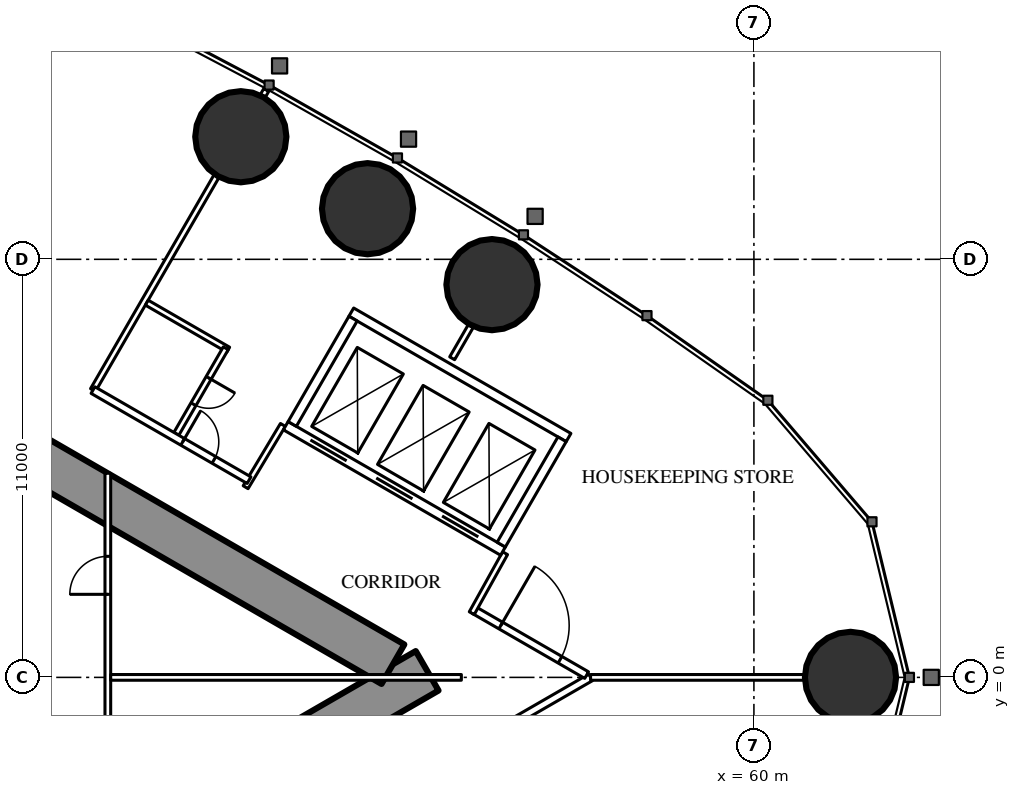
"""IFC4 building model, lengths in metres.
Left out: names, types, materials, properties, quantities, classifications, styles, units other than length and angle.
Written with IfcOpenShell. Run it as: python <this file> out.ifc"""

import sys

from ifc_helpers import new_model, si_unit, direction, frame, frame_2d, origin, origin_2d, place, context, subcontext, project, spatial, rectangle, circle, extrude, element, fill, save


model = new_model("IFC4")
c1 = context("Model", 3, precision=1e-05, world=origin(), true_north=direction((0.0, 1.0)))
c2 = subcontext(c1, "Body", "Model", "MODEL_VIEW")
j1 = project(units=[si_unit("LENGTHUNIT", "METRE"), si_unit("PLANEANGLEUNIT", "RADIAN")], contexts=[c1])
p1 = place(None, origin())
s1 = spatial("IfcSite", under=j1, at=p1, CompositionType="ELEMENT")
p2 = place(p1, origin())
s2 = spatial("IfcBuilding", under=s1, at=p2, CompositionType="ELEMENT")
p3 = place(p2, frame((0.0, 0.0, 240.5)))
s3 = spatial("IfcBuildingStorey", under=s2, at=p3, CompositionType="ELEMENT", Elevation=240.5)
for number, where, z_axis, x_axis in (
    (1, (62.542, 0.0, 0.0), (0.0, 0.0, 1.0), (1.0, 0.0, 0.0)),
    (2, (53.108, 10.334, 0.0), (0.0, 0.0, 1.0), (1.0, 0.0, 0.0)),
    (3, (49.834, 12.332, 0.0), (0.0, 0.0, 1.0), (1.0, 0.0, 0.0)),
    (4, (46.499, 14.226, 0.0), (0.0, 0.0, 1.0), (1.0, 0.0, 0.0)),
):
    element("IfcColumn", number, at=place(p3, frame(where, z_axis=z_axis, x_axis=x_axis)), inside=s3, PredefinedType="COLUMN", context=c2, shape_type="SweptSolid", body=[
        extrude(circle(Radius=1.2, at=origin_2d()), origin(), (0.0, 0.0, 1.0), 3.6),
    ])
p4 = place(p3, frame((27.2, -13.8, 0.0), z_axis=(0.0, 0.0, 1.0), x_axis=(0.866027159892, 0.499996958321, 0.0)))
e5 = element("IfcWall", 5, at=p4, inside=s3, PredefinedType="SHEAR", context=c2, shape_type="SweptSolid", body=[
    extrude(rectangle(XDim=27.947, YDim=1.2, at=frame_2d((13.973, 0.0))), origin(), (0.0, 0.0, 1.0), 3.6),
])
p5 = place(p4, frame((4.6, 0.0, 0.0)))
e6 = element("IfcOpeningElement", 6, at=p5, cuts=e5, PredefinedType="OPENING", context=c2, shape_type="SweptSolid", body=[
    extrude(rectangle(XDim=1.0, YDim=2.2, at=frame_2d((0.5, 1.1))), frame((0.0, 0.61, 0.0), z_axis=(0.0, -1.0, 0.0), x_axis=(1.0, 0.0, 0.0)), (0.0, 0.0, 1.0), 1.22),
])
p6 = place(p4, frame((13.395, 0.0, 0.0)))
e7 = element("IfcOpeningElement", 7, at=p6, cuts=e5, PredefinedType="OPENING", context=c2, shape_type="SweptSolid", body=[
    extrude(rectangle(XDim=1.8, YDim=2.2, at=frame_2d((0.9, 1.1))), frame((0.0, 0.61, 0.0), z_axis=(0.0, -1.0, 0.0), x_axis=(1.0, 0.0, 0.0)), (0.0, 0.0, 1.0), 1.22),
])
p7 = place(p3, frame((27.2, 13.8, 0.0), z_axis=(0.0, 0.0, 1.0), x_axis=(0.866024515034, -0.500001539357, 0.0)))
e8 = element("IfcWall", 8, at=p7, inside=s3, PredefinedType="SHEAR", context=c2, shape_type="SweptSolid", body=[
    extrude(rectangle(XDim=26.907, YDim=1.2, at=frame_2d((13.454, 0.0))), origin(), (0.0, 0.0, 1.0), 3.6),
])
p8 = place(p7, frame((4.6, 0.0, 0.0)))
e9 = element("IfcOpeningElement", 9, at=p8, cuts=e8, PredefinedType="OPENING", context=c2, shape_type="SweptSolid", body=[
    extrude(rectangle(XDim=1.0, YDim=2.2, at=frame_2d((0.5, 1.1))), frame((0.0, 0.61, 0.0), z_axis=(0.0, -1.0, 0.0), x_axis=(1.0, 0.0, 0.0)), (0.0, 0.0, 1.0), 1.22),
])
p9 = place(p7, frame((13.395, 0.0, 0.0)))
e10 = element("IfcOpeningElement", 10, at=p9, cuts=e8, PredefinedType="OPENING", context=c2, shape_type="SweptSolid", body=[
    extrude(rectangle(XDim=1.8, YDim=2.2, at=frame_2d((0.9, 1.1))), frame((0.0, 0.61, 0.0), z_axis=(0.0, -1.0, 0.0), x_axis=(1.0, 0.0, 0.0)), (0.0, 0.0, 1.0), 1.22),
])
p10 = place(p3, frame((28.959, -15.44, 0.0), z_axis=(0.0, 0.0, 1.0), x_axis=(0.866025227435, 0.500000305447, 0.0)))
e11 = element("IfcWall", 11, at=p10, inside=s3, PredefinedType="PARTITIONING", context=c2, shape_type="SweptSolid", body=[
    extrude(rectangle(XDim=30.88, YDim=0.2, at=frame_2d((15.44, 0.0))), origin(), (0.0, 0.0, 1.0), 3.35),
])
p11 = place(p10, frame((1.494, 0.0, 0.0)))
e12 = element("IfcOpeningElement", 12, at=p11, cuts=e11, PredefinedType="OPENING", context=c2, shape_type="SweptSolid", body=[
    extrude(rectangle(XDim=1.8, YDim=2.03, at=frame_2d((0.9, 1.015))), frame((0.0, 0.11, 0.0), z_axis=(0.0, -1.0, 0.0), x_axis=(1.0, 0.0, 0.0)), (0.0, 0.0, 1.0), 0.22),
])
p12 = place(p10, frame((7.687, 0.0, 0.0)))
e13 = element("IfcOpeningElement", 13, at=p12, cuts=e11, PredefinedType="OPENING", context=c2, shape_type="SweptSolid", body=[
    extrude(rectangle(XDim=1.0, YDim=2.2, at=frame_2d((0.5, 1.1))), frame((0.0, 0.11, 0.0), z_axis=(0.0, -1.0, 0.0), x_axis=(1.0, 0.0, 0.0)), (0.0, 0.0, 1.0), 0.22),
])
p13 = place(p10, frame((16.137, 0.0, 0.0)))
e14 = element("IfcOpeningElement", 14, at=p13, cuts=e11, PredefinedType="OPENING", context=c2, shape_type="SweptSolid", body=[
    extrude(rectangle(XDim=0.95, YDim=2.2, at=frame_2d((0.475, 1.1))), frame((0.0, 0.11, 0.0), z_axis=(0.0, -1.0, 0.0), x_axis=(1.0, 0.0, 0.0)), (0.0, 0.0, 1.0), 0.22),
])
p14 = place(p10, frame((20.021, 0.0, 0.0)))
e15 = element("IfcOpeningElement", 15, at=p14, cuts=e11, PredefinedType="OPENING", context=c2, shape_type="SweptSolid", body=[
    extrude(rectangle(XDim=0.95, YDim=2.2, at=frame_2d((0.475, 1.1))), frame((0.0, 0.11, 0.0), z_axis=(0.0, -1.0, 0.0), x_axis=(1.0, 0.0, 0.0)), (0.0, 0.0, 1.0), 0.22),
])
p15 = place(p10, frame((26.253, 0.0, 0.0)))
e16 = element("IfcOpeningElement", 16, at=p15, cuts=e11, PredefinedType="OPENING", context=c2, shape_type="SweptSolid", body=[
    extrude(rectangle(XDim=0.95, YDim=2.2, at=frame_2d((0.475, 1.1))), frame((0.0, 0.11, 0.0), z_axis=(0.0, -1.0, 0.0), x_axis=(1.0, 0.0, 0.0)), (0.0, 0.0, 1.0), 0.22),
])
p16 = place(p3, frame((42.61, 7.559, 0.0), z_axis=(0.0, 0.0, 1.0), x_axis=(0.500014058812, 0.866017286774, 0.0)))
e17 = element("IfcWall", 17, at=p16, inside=s3, PredefinedType="PARTITIONING", context=c2, shape_type="SweptSolid", body=[
    extrude(rectangle(XDim=6.498, YDim=0.15, at=frame_2d((3.249, 0.0))), origin(), (0.0, 0.0, 1.0), 2.45),
])
p17 = place(p3, frame((47.079, 15.3, 0.0), z_axis=(0.0, 0.0, 1.0), x_axis=(0.499212083968, 0.866479829667, 0.0)))
e18 = element("IfcWall", 18, at=p17, inside=s3, PredefinedType="PARTITIONING", context=c2, shape_type="SweptSolid", body=[
    extrude(rectangle(XDim=0.179, YDim=0.15, at=frame_2d((0.09, 0.0))), origin(), (0.0, 0.0, 1.0), 2.45),
])
p18 = place(p3, frame((55.702, 0.0, 0.0), z_axis=(0.0, 0.0, 1.0), x_axis=(1.0, 0.0, 0.0)))
e19 = element("IfcWall", 19, at=p18, inside=s3, PredefinedType="PARTITIONING", context=c2, shape_type="SweptSolid", body=[
    extrude(rectangle(XDim=5.619, YDim=0.15, at=frame_2d((2.81, 0.0))), origin(), (0.0, 0.0, 1.0), 2.45),
])
p19 = place(p3, frame((52.06, 8.396, 0.0), z_axis=(0.0, 0.0, 1.0), x_axis=(0.500095379624, 0.865970329329, 0.0)))
e20 = element("IfcWall", 20, at=p19, inside=s3, PredefinedType="PARTITIONING", context=c2, shape_type="SweptSolid", body=[
    extrude(rectangle(XDim=0.982, YDim=0.15, at=frame_2d((0.491, 0.0))), origin(), (0.0, 0.0, 1.0), 3.35),
])
p20 = place(p3, frame((52.639, 1.769, 0.0), z_axis=(0.0, 0.0, 1.0), x_axis=(0.866027340901, -0.4999966448, 0.0)))
e21 = element("IfcWall", 21, at=p20, inside=s3, PredefinedType="PARTITIONING", context=c2, shape_type="SweptSolid", body=[
    extrude(rectangle(XDim=3.417, YDim=0.2, at=frame_2d((1.708, 0.0))), origin(), (0.0, 0.0, 1.0), 3.35),
])
p21 = place(p20, frame((0.809, 0.0, 0.0)))
e22 = element("IfcOpeningElement", 22, at=p21, cuts=e21, PredefinedType="OPENING", context=c2, shape_type="SweptSolid", body=[
    extrude(rectangle(XDim=1.8, YDim=2.2, at=frame_2d((0.9, 1.1))), frame((0.0, 0.11, 0.0), z_axis=(0.0, -1.0, 0.0), x_axis=(1.0, 0.0, 0.0)), (0.0, 0.0, 1.0), 0.22),
])
p22 = place(p3, frame((47.606, 6.642, 0.0), z_axis=(0.0, 0.0, 1.0), x_axis=(-0.51353662755, -0.858067673418, 0.0)))
e23 = element("IfcWall", 23, at=p22, inside=s3, PredefinedType="PARTITIONING", context=c2, shape_type="SweptSolid", body=[
    extrude(rectangle(XDim=1.91, YDim=0.15, at=frame_2d((0.955, 0.0))), origin(), (0.0, 0.0, 1.0), 3.35),
])
p23 = place(p3, frame((52.576, 1.689, 0.0), z_axis=(0.0, 0.0, 1.0), x_axis=(0.485424724123, 0.874278466629, 0.0)))
e24 = element("IfcWall", 24, at=p23, inside=s3, PredefinedType="PARTITIONING", context=c2, shape_type="SweptSolid", body=[
    extrude(rectangle(XDim=1.805, YDim=0.15, at=frame_2d((0.903, 0.0))), origin(), (0.0, 0.0, 1.0), 3.35),
])
p24 = place(p3, frame((44.025, 9.86, 0.0), z_axis=(0.0, 0.0, 1.0), x_axis=(0.866006523861, -0.500032699561, 0.0)))
e25 = element("IfcWall", 25, at=p24, inside=s3, PredefinedType="PARTITIONING", context=c2, shape_type="SweptSolid", body=[
    extrude(rectangle(XDim=2.475, YDim=0.15, at=frame_2d((1.237, 0.0))), origin(), (0.0, 0.0, 1.0), 3.35),
])
p25 = place(p3, frame((44.803, 6.408, 0.0), z_axis=(0.0, 0.0, 1.0), x_axis=(0.500047596559, 0.865997922154, 0.0)))
e26 = element("IfcWall", 26, at=p25, inside=s3, PredefinedType="PARTITIONING", context=c2, shape_type="SweptSolid", body=[
    extrude(rectangle(XDim=2.6, YDim=0.15, at=frame_2d((1.3, 0.0))), origin(), (0.0, 0.0, 1.0), 3.35),
])
p26 = place(p25, frame((0.9, 0.0, 0.0)))
e27 = element("IfcOpeningElement", 27, at=p26, cuts=e26, PredefinedType="OPENING", context=c2, shape_type="SweptSolid", body=[
    extrude(rectangle(XDim=0.8, YDim=2.2, at=frame_2d((0.4, 1.1))), frame((0.0, 0.085, 0.0), z_axis=(0.0, -1.0, 0.0), x_axis=(1.0, 0.0, 0.0)), (0.0, 0.0, 1.0), 0.17),
])
p27 = place(p3, frame((42.61, 7.559, 0.0), z_axis=(0.0, 0.0, 1.0), x_axis=(0.866032081755, -0.499988433238, 0.0)))
e28 = element("IfcWall", 28, at=p27, inside=s3, PredefinedType="PARTITIONING", context=c2, shape_type="SweptSolid", body=[
    extrude(rectangle(XDim=4.741, YDim=0.2, at=frame_2d((2.37, 0.0))), origin(), (0.0, 0.0, 1.0), 3.35),
])
p28 = place(p27, frame((2.725, 0.0, 0.0)))
e29 = element("IfcOpeningElement", 29, at=p28, cuts=e28, PredefinedType="OPENING", context=c2, shape_type="SweptSolid", body=[
    extrude(rectangle(XDim=0.95, YDim=2.2, at=frame_2d((0.475, 1.1))), frame((0.0, 0.11, 0.0), z_axis=(0.0, -1.0, 0.0), x_axis=(1.0, 0.0, 0.0)), (0.0, 0.0, 1.0), 0.22),
])
p29 = place(p3, frame((43.0, -5.371, 0.0), z_axis=(0.0, 0.0, 1.0), x_axis=(0.0, 1.0, 0.0)))
e30 = element("IfcWall", 30, at=p29, inside=s3, PredefinedType="PARTITIONING", context=c2, shape_type="SweptSolid", body=[
    extrude(rectangle(XDim=10.741, YDim=0.15, at=frame_2d((5.371, 0.0))), origin(), (0.0, 0.0, 1.0), 3.35),
])
p30 = place(p29, frame((2.185, 0.0, 0.0)))
e31 = element("IfcOpeningElement", 31, at=p30, cuts=e30, PredefinedType="OPENING", context=c2, shape_type="SweptSolid", body=[
    extrude(rectangle(XDim=1.0, YDim=2.2, at=frame_2d((0.5, 1.1))), frame((0.0, 0.085, 0.0), z_axis=(0.0, -1.0, 0.0), x_axis=(1.0, 0.0, 0.0)), (0.0, 0.0, 1.0), 0.17),
])
p31 = place(p29, frame((7.556, 0.0, 0.0)))
e32 = element("IfcOpeningElement", 32, at=p31, cuts=e30, PredefinedType="OPENING", context=c2, shape_type="SweptSolid", body=[
    extrude(rectangle(XDim=1.0, YDim=2.2, at=frame_2d((0.5, 1.1))), frame((0.0, 0.085, 0.0), z_axis=(0.0, -1.0, 0.0), x_axis=(1.0, 0.0, 0.0)), (0.0, 0.0, 1.0), 0.17),
])
p32 = place(p3, frame((43.075, 0.0, 0.0), z_axis=(0.0, 0.0, 1.0), x_axis=(1.0, 0.0, 0.0)))
e33 = element("IfcWall", 33, at=p32, inside=s3, PredefinedType="PARTITIONING", context=c2, shape_type="SweptSolid", body=[
    extrude(rectangle(XDim=9.227, YDim=0.15, at=frame_2d((4.614, 0.0))), origin(), (0.0, 0.0, 1.0), 2.45),
])
p33 = place(p3, frame((47.681, 6.622, 0.0), z_axis=(0.0, 0.0, 1.0), x_axis=(0.86603344179, -0.499986077507, 0.0)))
e34 = element("IfcWall", 34, at=p33, inside=s3, PredefinedType="PARTITIONING", context=c2, shape_type="SweptSolid", body=[
    extrude(rectangle(XDim=6.6, YDim=0.25, at=frame_2d((3.3, 0.0))), origin(), (0.0, 0.0, 1.0), 3.35),
])
p34 = place(p33, frame((0.75, 0.0, 0.0)))
e35 = element("IfcOpeningElement", 35, at=p34, cuts=e34, PredefinedType="OPENING", context=c2, shape_type="SweptSolid", body=[
    extrude(rectangle(XDim=1.1, YDim=2.2, at=frame_2d((0.55, 1.1))), frame((0.0, 0.135, 0.0), z_axis=(0.0, -1.0, 0.0), x_axis=(1.0, 0.0, 0.0)), (0.0, 0.0, 1.0), 0.27),
])
p35 = place(p33, frame((2.75, 0.0, 0.0)))
e36 = element("IfcOpeningElement", 36, at=p35, cuts=e34, PredefinedType="OPENING", context=c2, shape_type="SweptSolid", body=[
    extrude(rectangle(XDim=1.1, YDim=2.2, at=frame_2d((0.55, 1.1))), frame((0.0, 0.135, 0.0), z_axis=(0.0, -1.0, 0.0), x_axis=(1.0, 0.0, 0.0)), (0.0, 0.0, 1.0), 0.27),
])
p36 = place(p33, frame((4.75, 0.0, 0.0)))
e37 = element("IfcOpeningElement", 37, at=p36, cuts=e34, PredefinedType="OPENING", context=c2, shape_type="SweptSolid", body=[
    extrude(rectangle(XDim=1.1, YDim=2.2, at=frame_2d((0.55, 1.1))), frame((0.0, 0.135, 0.0), z_axis=(0.0, -1.0, 0.0), x_axis=(1.0, 0.0, 0.0)), (0.0, 0.0, 1.0), 0.27),
])
p37 = place(p3, frame((49.406, 9.611, 0.0), z_axis=(0.0, 0.0, 1.0), x_axis=(0.86603344179, -0.499986077507, 0.0)))
e38 = element("IfcWall", 38, at=p37, inside=s3, PredefinedType="PARTITIONING", context=c2, shape_type="SweptSolid", body=[
    extrude(rectangle(XDim=6.6, YDim=0.25, at=frame_2d((3.3, 0.0))), origin(), (0.0, 0.0, 1.0), 3.35),
])
p38 = place(p3, frame((47.852, 6.668, 0.0), z_axis=(0.0, 0.0, 1.0), x_axis=(0.499929347863, 0.866066190972, 0.0)))
e39 = element("IfcWall", 39, at=p38, inside=s3, PredefinedType="PARTITIONING", context=c2, shape_type="SweptSolid", body=[
    extrude(rectangle(XDim=3.201, YDim=0.25, at=frame_2d((1.6, 0.0))), origin(), (0.0, 0.0, 1.0), 3.35),
])
p39 = place(p3, frame((53.352, 3.493, 0.0), z_axis=(0.0, 0.0, 1.0), x_axis=(0.499872130319, 0.866099216793, 0.0)))
e40 = element("IfcWall", 40, at=p39, inside=s3, PredefinedType="PARTITIONING", context=c2, shape_type="SweptSolid", body=[
    extrude(rectangle(XDim=3.2, YDim=0.25, at=frame_2d((1.6, 0.0))), origin(), (0.0, 0.0, 1.0), 3.35),
])
p40 = place(p26, origin())
e41 = element("IfcDoor", 41, at=p40, inside=s3, OperationType="SINGLE_SWING_RIGHT", PredefinedType="DOOR", context=c2, shape_type="SweptSolid", body=[
    extrude(rectangle(XDim=0.8, YDim=2.2, at=frame_2d((0.4, 1.1))), frame((0.0, 0.025, 0.0), z_axis=(0.0, -1.0, 0.0), x_axis=(1.0, 0.0, 0.0)), (0.0, 0.0, 1.0), 0.05),
])
fill(e27, e41)
p41 = place(p28, origin())
e42 = element("IfcDoor", 42, at=p41, inside=s3, OperationType="SINGLE_SWING_LEFT", PredefinedType="DOOR", context=c2, shape_type="SweptSolid", body=[
    extrude(rectangle(XDim=0.95, YDim=2.2, at=frame_2d((0.475, 1.1))), frame((0.0, 0.025, 0.0), z_axis=(0.0, -1.0, 0.0), x_axis=(1.0, 0.0, 0.0)), (0.0, 0.0, 1.0), 0.05),
])
fill(e29, e42)
p42 = place(p21, origin())
e43 = element("IfcDoor", 43, at=p42, inside=s3, OperationType="DOUBLE_DOOR_SINGLE_SWING", PredefinedType="DOOR", context=c2, shape_type="SweptSolid", body=[
    extrude(rectangle(XDim=1.8, YDim=2.2, at=frame_2d((0.9, 1.1))), frame((0.0, 0.025, 0.0), z_axis=(0.0, -1.0, 0.0), x_axis=(1.0, 0.0, 0.0)), (0.0, 0.0, 1.0), 0.05),
])
fill(e22, e43)
p43 = place(p31, origin())
e44 = element("IfcDoor", 44, at=p43, inside=s3, OperationType="SINGLE_SWING_LEFT", PredefinedType="DOOR", context=c2, shape_type="SweptSolid", body=[
    extrude(rectangle(XDim=1.0, YDim=2.2, at=frame_2d((0.5, 1.1))), frame((0.0, 0.025, 0.0), z_axis=(0.0, -1.0, 0.0), x_axis=(1.0, 0.0, 0.0)), (0.0, 0.0, 1.0), 0.05),
])
fill(e32, e44)
p44 = place(p34, origin())
e45 = element("IfcDoor", 45, at=p44, inside=s3, OperationType="DOUBLE_DOOR_SLIDING", PredefinedType="USERDEFINED", context=c2, shape_type="SweptSolid", body=[
    extrude(rectangle(XDim=1.1, YDim=2.2, at=frame_2d((0.55, 1.1))), frame((0.0, 0.025, 0.0), z_axis=(0.0, -1.0, 0.0), x_axis=(1.0, 0.0, 0.0)), (0.0, 0.0, 1.0), 0.05),
])
fill(e35, e45)
p45 = place(p35, origin())
e46 = element("IfcDoor", 46, at=p45, inside=s3, OperationType="DOUBLE_DOOR_SLIDING", PredefinedType="USERDEFINED", context=c2, shape_type="SweptSolid", body=[
    extrude(rectangle(XDim=1.1, YDim=2.2, at=frame_2d((0.55, 1.1))), frame((0.0, 0.025, 0.0), z_axis=(0.0, -1.0, 0.0), x_axis=(1.0, 0.0, 0.0)), (0.0, 0.0, 1.0), 0.05),
])
fill(e36, e46)
p46 = place(p36, origin())
e47 = element("IfcDoor", 47, at=p46, inside=s3, OperationType="DOUBLE_DOOR_SLIDING", PredefinedType="USERDEFINED", context=c2, shape_type="SweptSolid", body=[
    extrude(rectangle(XDim=1.1, YDim=2.2, at=frame_2d((0.55, 1.1))), frame((0.0, 0.025, 0.0), z_axis=(0.0, -1.0, 0.0), x_axis=(1.0, 0.0, 0.0)), (0.0, 0.0, 1.0), 0.05),
])
fill(e37, e47)
save(model, sys.argv[1])
